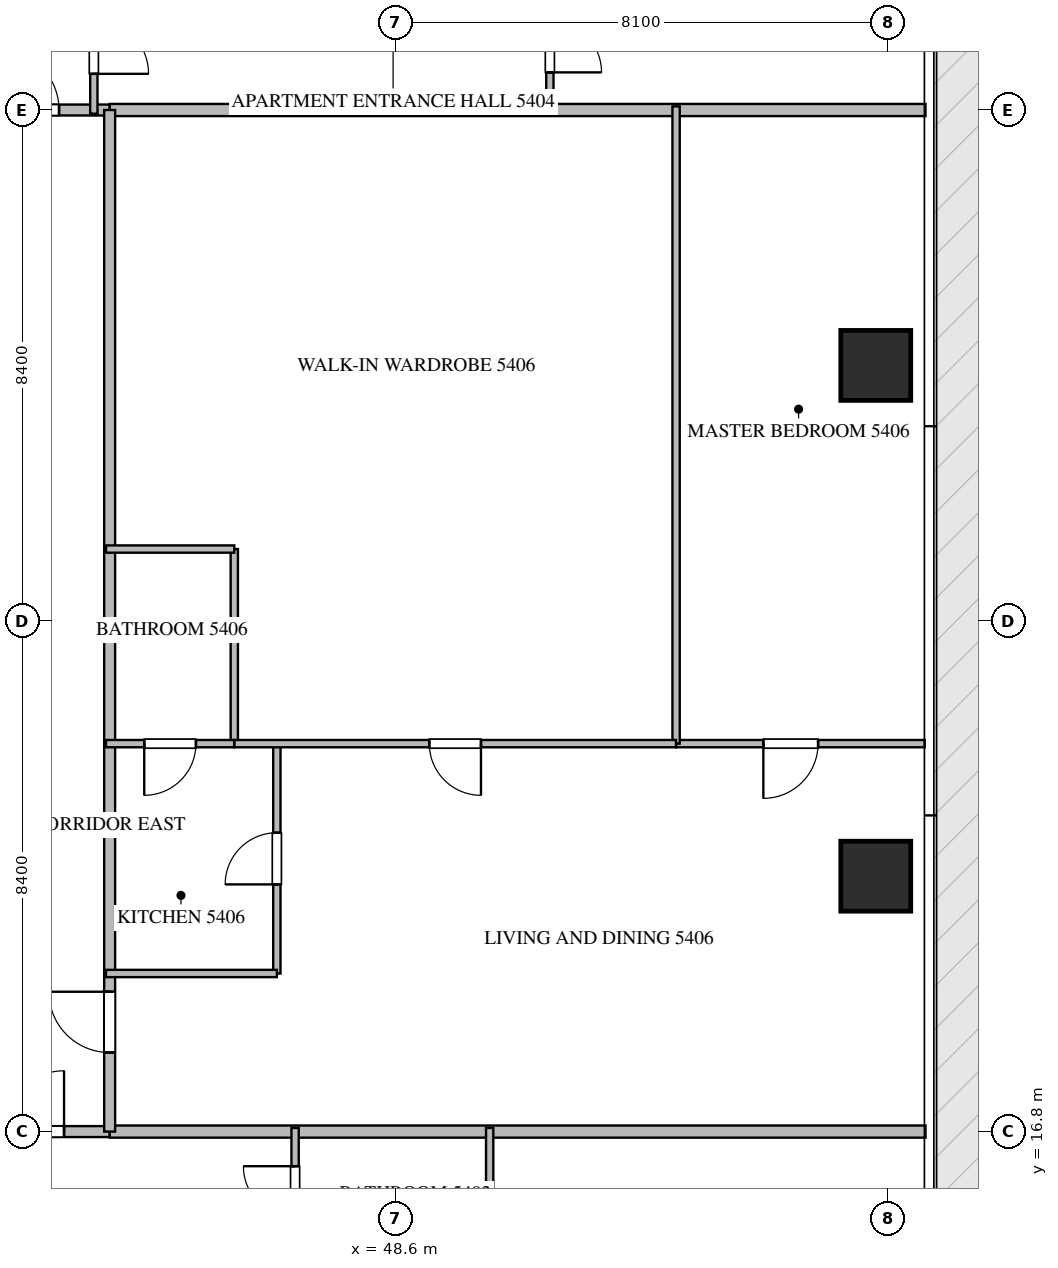
"""IFC4 building model, lengths in metres.
Left out: names, types, materials, properties, quantities, classifications, styles, units other than length and angle.
Written with IfcOpenShell. Run it as: python <this file> out.ifc"""

import sys

from ifc_helpers import new_model, si_unit, direction, frame, frame_2d, origin, origin_2d, place, context, subcontext, project, spatial, rectangle, extrude, source, transform, mapped, element, fill, save


model = new_model("IFC4")
c1 = context("Model", 3, precision=1e-05, world=origin(), true_north=direction((0.0, 1.0)))
c2 = subcontext(c1, "Body", "Model", "MODEL_VIEW")
j1 = project(units=[si_unit("LENGTHUNIT", "METRE"), si_unit("PLANEANGLEUNIT", "RADIAN")], contexts=[c1])
p1 = place(None, origin())
s1 = spatial("IfcSite", under=j1, at=p1, CompositionType="ELEMENT")
p2 = place(p1, origin())
s2 = spatial("IfcBuilding", under=s1, at=p2, CompositionType="ELEMENT")
p3 = place(p2, frame((0.0, 0.0, 218.15)))
s3 = spatial("IfcBuildingStorey", under=s2, at=p3, CompositionType="ELEMENT", Elevation=218.15)
m1 = source(origin(), c2, "Body", "SweptSolid", [
    extrude(rectangle(XDim=1.15, YDim=1.15, at=origin_2d()), origin(), (0.0, 0.0, 1.0), 3.85),
])
for number, where, z_axis, x_axis in (
    (1, (56.5, 21.0, -0.26), (0.0, 0.0, 1.0), (1.0, 0.0, 0.0)),
    (2, (56.5, 29.4, -0.26), (0.0, 0.0, 1.0), (1.0, 0.0, 0.0)),
):
    element("IfcColumn", number, at=place(p3, frame(where, z_axis=z_axis, x_axis=x_axis)), inside=s3, PredefinedType="COLUMN", context=c2, shape_type="MappedRepresentation", body=[
        mapped(m1, transform((0.0, 0.0, 0.0), scale=1.0)),
    ])
for number, where, z_axis, x_axis in (
    (3, (43.9, 16.8, 0.0), (0.0, 0.0, 1.0), (1.0, 0.0, 0.0)),
    (4, (43.9, 33.6, 0.0), (0.0, 0.0, 1.0), (1.0, 0.0, 0.0)),
):
    element("IfcWall", number, at=place(p3, frame(where, z_axis=z_axis, x_axis=x_axis)), inside=s3, PredefinedType="PARTITIONING", context=c2, shape_type="SweptSolid", body=[
        extrude(rectangle(XDim=13.418, YDim=0.2, at=frame_2d((6.709, 0.0))), origin(), (0.0, 0.0, 1.0), 3.59),
    ])
p4 = place(p3, frame((41.402, 16.8, 0.0), z_axis=(0.0, 0.0, 1.0), x_axis=(1.0, 0.0, 0.0)))
e5 = element("IfcWall", 5, at=p4, inside=s3, PredefinedType="PARTITIONING", context=c2, shape_type="SweptSolid", body=[
    extrude(rectangle(XDim=2.496, YDim=0.18, at=frame_2d((1.248, 0.0))), origin(), (0.0, 0.0, 1.0), 3.59),
])
p5 = place(p4, frame((0.748, 0.0, 0.0)))
e6 = element("IfcOpeningElement", 6, at=p5, cuts=e5, PredefinedType="OPENING", context=c2, shape_type="SweptSolid", body=[
    extrude(rectangle(XDim=1.0, YDim=2.15, at=frame_2d((0.5, 1.075))), frame((0.0, 0.1, 0.0), z_axis=(0.0, -1.0, 0.0), x_axis=(1.0, 0.0, 0.0)), (0.0, 0.0, 1.0), 0.2),
])
p6 = place(p3, frame((41.402, 33.6, 0.0), z_axis=(0.0, 0.0, 1.0), x_axis=(1.0, 0.0, 0.0)))
e7 = element("IfcWall", 7, at=p6, inside=s3, PredefinedType="PARTITIONING", context=c2, shape_type="SweptSolid", body=[
    extrude(rectangle(XDim=2.496, YDim=0.18, at=frame_2d((1.248, 0.0))), origin(), (0.0, 0.0, 1.0), 3.59),
])
p7 = place(p6, frame((0.666, 0.0, 0.0)))
e8 = element("IfcOpeningElement", 8, at=p7, cuts=e7, PredefinedType="OPENING", context=c2, shape_type="SweptSolid", body=[
    extrude(rectangle(XDim=1.0, YDim=2.15, at=frame_2d((0.5, 1.075))), frame((0.0, 0.1, 0.0), z_axis=(0.0, -1.0, 0.0), x_axis=(1.0, 0.0, 0.0)), (0.0, 0.0, 1.0), 0.2),
])
p8 = place(p3, frame((43.9, 16.8, 0.0), z_axis=(0.0, 0.0, 1.0), x_axis=(0.0, 1.0, 0.0)))
e9 = element("IfcWall", 9, at=p8, inside=s3, PredefinedType="PARTITIONING", context=c2, shape_type="SweptSolid", body=[
    extrude(rectangle(XDim=16.8, YDim=0.18, at=frame_2d((8.4, 0.0))), origin(), (0.0, 0.0, 1.0), 3.59),
])
p9 = place(p8, frame((1.3, 0.0, 0.0)))
e10 = element("IfcOpeningElement", 10, at=p9, cuts=e9, PredefinedType="OPENING", context=c2, shape_type="SweptSolid", body=[
    extrude(rectangle(XDim=1.0, YDim=2.15, at=frame_2d((0.5, 1.075))), frame((0.0, 0.1, 0.0), z_axis=(0.0, -1.0, 0.0), x_axis=(1.0, 0.0, 0.0)), (0.0, 0.0, 1.0), 0.2),
])
p10 = place(p3, frame((50.15, 14.75, 0.0), z_axis=(0.0, 0.0, 1.0), x_axis=(0.0, 1.0, 0.0)))
e11 = element("IfcWall", 11, at=p10, inside=s3, PredefinedType="PARTITIONING", context=c2, shape_type="SweptSolid", body=[
    extrude(rectangle(XDim=2.11, YDim=0.12, at=frame_2d((1.055, 0.0))), origin(), (0.0, 0.0, 1.0), 3.59),
])
p11 = place(p3, frame((46.95, 14.752, 0.0), z_axis=(0.0, 0.0, 1.0), x_axis=(0.0, 1.0, 0.0)))
e12 = element("IfcWall", 12, at=p11, inside=s3, PredefinedType="PARTITIONING", context=c2, shape_type="SweptSolid", body=[
    extrude(rectangle(XDim=2.108, YDim=0.12, at=frame_2d((1.054, 0.0))), origin(), (0.0, 0.0, 1.0), 3.59),
])
p12 = place(p11, frame((0.629, 0.0, 0.0)))
e13 = element("IfcOpeningElement", 13, at=p12, cuts=e12, PredefinedType="OPENING", context=c2, shape_type="SweptSolid", body=[
    extrude(rectangle(XDim=0.85, YDim=2.1, at=frame_2d((0.425, 1.05))), frame((0.0, 0.07, 0.0), z_axis=(0.0, -1.0, 0.0), x_axis=(1.0, 0.0, 0.0)), (0.0, 0.0, 1.0), 0.14),
])
p13 = place(p3, frame((43.64, 35.75, 0.0), z_axis=(0.0, 0.0, 1.0), x_axis=(0.0, -1.0, 0.0)))
e14 = element("IfcWall", 14, at=p13, inside=s3, PredefinedType="PARTITIONING", context=c2, shape_type="SweptSolid", body=[
    extrude(rectangle(XDim=2.21, YDim=0.12, at=frame_2d((1.105, 0.0))), origin(), (0.0, 0.0, 1.0), 3.59),
])
p14 = place(p13, frame((0.655, 0.0, 0.0)))
e15 = element("IfcOpeningElement", 15, at=p14, cuts=e14, PredefinedType="OPENING", context=c2, shape_type="SweptSolid", body=[
    extrude(rectangle(XDim=0.9, YDim=2.1, at=frame_2d((0.45, 1.05))), frame((0.0, 0.07, 0.0), z_axis=(0.0, -1.0, 0.0), x_axis=(1.0, 0.0, 0.0)), (0.0, 0.0, 1.0), 0.14),
])
p15 = place(p3, frame((51.14, 35.748, 0.0), z_axis=(0.0, 0.0, 1.0), x_axis=(0.0, -1.0, 0.0)))
e16 = element("IfcWall", 16, at=p15, inside=s3, PredefinedType="PARTITIONING", context=c2, shape_type="SweptSolid", body=[
    extrude(rectangle(XDim=2.208, YDim=0.12, at=frame_2d((1.104, 0.0))), origin(), (0.0, 0.0, 1.0), 3.59),
])
p16 = place(p15, frame((0.679, 0.0, 0.0)))
e17 = element("IfcOpeningElement", 17, at=p16, cuts=e16, PredefinedType="OPENING", context=c2, shape_type="SweptSolid", body=[
    extrude(rectangle(XDim=0.85, YDim=2.1, at=frame_2d((0.425, 1.05))), frame((0.0, 0.07, 0.0), z_axis=(0.0, -1.0, 0.0), x_axis=(1.0, 0.0, 0.0)), (0.0, 0.0, 1.0), 0.14),
])
p17 = place(p3, frame((46.65, 19.4, 0.0), z_axis=(0.0, 0.0, 1.0), x_axis=(0.0, 1.0, 0.0)))
e18 = element("IfcWall", 18, at=p17, inside=s3, PredefinedType="PARTITIONING", context=c2, shape_type="SweptSolid", body=[
    extrude(rectangle(XDim=3.78, YDim=0.12, at=frame_2d((1.89, 0.0))), origin(), (0.0, 0.0, 1.0), 3.59),
])
p18 = place(p17, frame((1.465, 0.0, 0.0)))
e19 = element("IfcOpeningElement", 19, at=p18, cuts=e18, PredefinedType="OPENING", context=c2, shape_type="SweptSolid", body=[
    extrude(rectangle(XDim=0.85, YDim=2.1, at=frame_2d((0.425, 1.05))), frame((0.0, 0.07, 0.0), z_axis=(0.0, -1.0, 0.0), x_axis=(1.0, 0.0, 0.0)), (0.0, 0.0, 1.0), 0.14),
])
p19 = place(p3, frame((46.65, 19.4, 0.0), z_axis=(0.0, 0.0, 1.0), x_axis=(-1.0, 0.0, 0.0)))
e20 = element("IfcWall", 20, at=p19, inside=s3, PredefinedType="PARTITIONING", context=c2, shape_type="SweptSolid", body=[
    extrude(rectangle(XDim=2.81, YDim=0.12, at=frame_2d((1.405, 0.0))), origin(), (0.0, 0.0, 1.0), 3.59),
])
p20 = place(p3, frame((57.305, 23.18, 0.0), z_axis=(0.0, 0.0, 1.0), x_axis=(-1.0, 0.0, 0.0)))
e21 = element("IfcWall", 21, at=p20, inside=s3, PredefinedType="PARTITIONING", context=c2, shape_type="SweptSolid", body=[
    extrude(rectangle(XDim=4.089, YDim=0.12, at=frame_2d((2.044, 0.0))), origin(), (0.0, 0.0, 1.0), 3.59),
])
p21 = place(p20, frame((1.754, 0.0, 0.0)))
e22 = element("IfcOpeningElement", 22, at=p21, cuts=e21, PredefinedType="OPENING", context=c2, shape_type="SweptSolid", body=[
    extrude(rectangle(XDim=0.9, YDim=2.1, at=frame_2d((0.45, 1.05))), frame((0.0, 0.07, 0.0), z_axis=(0.0, -1.0, 0.0), x_axis=(1.0, 0.0, 0.0)), (0.0, 0.0, 1.0), 0.14),
])
p22 = place(p3, frame((53.216, 23.18, 0.0), z_axis=(0.0, 0.0, 1.0), x_axis=(0.0, 1.0, 0.0)))
e23 = element("IfcWall", 23, at=p22, inside=s3, PredefinedType="PARTITIONING", context=c2, shape_type="SweptSolid", body=[
    extrude(rectangle(XDim=10.48, YDim=0.12, at=frame_2d((5.24, 0.0))), origin(), (0.0, 0.0, 1.0), 3.59),
])
p23 = place(p3, frame((45.95, 23.18, 0.0), z_axis=(0.0, 0.0, 1.0), x_axis=(0.0, 1.0, 0.0)))
e24 = element("IfcWall", 24, at=p23, inside=s3, PredefinedType="PARTITIONING", context=c2, shape_type="SweptSolid", body=[
    extrude(rectangle(XDim=3.2, YDim=0.12, at=frame_2d((1.6, 0.0))), origin(), (0.0, 0.0, 1.0), 3.59),
])
p24 = place(p3, frame((45.95, 26.38, 0.0), z_axis=(0.0, 0.0, 1.0), x_axis=(-1.0, 0.0, 0.0)))
e25 = element("IfcWall", 25, at=p24, inside=s3, PredefinedType="PARTITIONING", context=c2, shape_type="SweptSolid", body=[
    extrude(rectangle(XDim=2.11, YDim=0.12, at=frame_2d((1.055, 0.0))), origin(), (0.0, 0.0, 1.0), 3.59),
])
p25 = place(p3, frame((53.214, 23.18, 0.0), z_axis=(0.0, 0.0, 1.0), x_axis=(-1.0, 0.0, 0.0)))
e26 = element("IfcWall", 26, at=p25, inside=s3, PredefinedType="PARTITIONING", context=c2, shape_type="SweptSolid", body=[
    extrude(rectangle(XDim=7.264, YDim=0.12, at=frame_2d((3.632, 0.0))), origin(), (0.0, 0.0, 1.0), 3.59),
])
p26 = place(p25, frame((3.207, 0.0, 0.0)))
e27 = element("IfcOpeningElement", 27, at=p26, cuts=e26, PredefinedType="OPENING", context=c2, shape_type="SweptSolid", body=[
    extrude(rectangle(XDim=0.85, YDim=2.1, at=frame_2d((0.425, 1.05))), frame((0.0, 0.07, 0.0), z_axis=(0.0, -1.0, 0.0), x_axis=(1.0, 0.0, 0.0)), (0.0, 0.0, 1.0), 0.14),
])
p27 = place(p3, frame((45.948, 23.18, 0.0), z_axis=(0.0, 0.0, 1.0), x_axis=(-1.0, 0.0, 0.0)))
e28 = element("IfcWall", 28, at=p27, inside=s3, PredefinedType="PARTITIONING", context=c2, shape_type="SweptSolid", body=[
    extrude(rectangle(XDim=2.108, YDim=0.12, at=frame_2d((1.054, 0.0))), origin(), (0.0, 0.0, 1.0), 3.59),
])
p28 = place(p27, frame((0.629, 0.0, 0.0)))
e29 = element("IfcOpeningElement", 29, at=p28, cuts=e28, PredefinedType="OPENING", context=c2, shape_type="SweptSolid", body=[
    extrude(rectangle(XDim=0.85, YDim=2.1, at=frame_2d((0.425, 1.05))), frame((0.0, 0.07, 0.0), z_axis=(0.0, -1.0, 0.0), x_axis=(1.0, 0.0, 0.0)), (0.0, 0.0, 1.0), 0.14),
])
m2 = source(origin(), c2, "Body", "SweptSolid", [
    extrude(rectangle(XDim=1.0, YDim=2.15, at=frame_2d((0.5, 1.075))), frame((0.0, 0.025, 0.0), z_axis=(0.0, -1.0, 0.0), x_axis=(1.0, 0.0, 0.0)), (0.0, 0.0, 1.0), 0.05),
])
p29 = place(p5, origin())
e30 = element("IfcDoor", 30, at=p29, inside=s3, OperationType="SINGLE_SWING_RIGHT", PredefinedType="DOOR", context=c2, shape_type="MappedRepresentation", body=[
    mapped(m2, transform((0.0, 0.0, 0.0), scale=1.0)),
])
fill(e6, e30)
p30 = place(p7, origin())
e31 = element("IfcDoor", 31, at=p30, inside=s3, OperationType="SINGLE_SWING_LEFT", PredefinedType="DOOR", context=c2, shape_type="MappedRepresentation", body=[
    mapped(m2, transform((0.0, 0.0, 0.0), scale=1.0)),
])
fill(e8, e31)
p31 = place(p9, origin())
e32 = element("IfcDoor", 32, at=p31, inside=s3, OperationType="SINGLE_SWING_RIGHT", PredefinedType="DOOR", context=c2, shape_type="MappedRepresentation", body=[
    mapped(m2, transform((0.0, 0.0, 0.0), scale=1.0)),
])
fill(e10, e32)
m3 = source(origin(), c2, "Body", "SweptSolid", [
    extrude(rectangle(XDim=0.85, YDim=2.1, at=frame_2d((0.425, 1.05))), frame((0.0, 0.025, 0.0), z_axis=(0.0, -1.0, 0.0), x_axis=(1.0, 0.0, 0.0)), (0.0, 0.0, 1.0), 0.05),
])
p32 = place(p12, origin())
e33 = element("IfcDoor", 33, at=p32, inside=s3, OperationType="SINGLE_SWING_RIGHT", PredefinedType="DOOR", context=c2, shape_type="MappedRepresentation", body=[
    mapped(m3, transform((0.0, 0.0, 0.0), scale=1.0)),
])
fill(e13, e33)
m4 = source(origin(), c2, "Body", "SweptSolid", [
    extrude(rectangle(XDim=0.9, YDim=2.1, at=frame_2d((0.45, 1.05))), frame((0.0, 0.025, 0.0), z_axis=(0.0, -1.0, 0.0), x_axis=(1.0, 0.0, 0.0)), (0.0, 0.0, 1.0), 0.05),
])
p33 = place(p14, origin())
e34 = element("IfcDoor", 34, at=p33, inside=s3, OperationType="SINGLE_SWING_RIGHT", PredefinedType="DOOR", context=c2, shape_type="MappedRepresentation", body=[
    mapped(m4, transform((0.0, 0.0, 0.0), scale=1.0)),
])
fill(e15, e34)
p34 = place(p16, origin())
e35 = element("IfcDoor", 35, at=p34, inside=s3, OperationType="SINGLE_SWING_RIGHT", PredefinedType="DOOR", context=c2, shape_type="MappedRepresentation", body=[
    mapped(m3, transform((0.0, 0.0, 0.0), scale=1.0)),
])
fill(e17, e35)
p35 = place(p18, origin())
e36 = element("IfcDoor", 36, at=p35, inside=s3, OperationType="SINGLE_SWING_LEFT", PredefinedType="DOOR", context=c2, shape_type="MappedRepresentation", body=[
    mapped(m3, transform((0.0, 0.0, 0.0), scale=1.0)),
])
fill(e19, e36)
p36 = place(p21, origin())
e37 = element("IfcDoor", 37, at=p36, inside=s3, OperationType="SINGLE_SWING_RIGHT", PredefinedType="DOOR", context=c2, shape_type="MappedRepresentation", body=[
    mapped(m4, transform((0.0, 0.0, 0.0), scale=1.0)),
])
fill(e22, e37)
p37 = place(p26, origin())
e38 = element("IfcDoor", 38, at=p37, inside=s3, OperationType="SINGLE_SWING_LEFT", PredefinedType="DOOR", context=c2, shape_type="MappedRepresentation", body=[
    mapped(m3, transform((0.0, 0.0, 0.0), scale=1.0)),
])
fill(e27, e38)
p38 = place(p28, origin())
e39 = element("IfcDoor", 39, at=p38, inside=s3, OperationType="SINGLE_SWING_RIGHT", PredefinedType="DOOR", context=c2, shape_type="MappedRepresentation", body=[
    mapped(m3, transform((0.0, 0.0, 0.0), scale=1.0)),
])
fill(e29, e39)
save(model, sys.argv[1])
